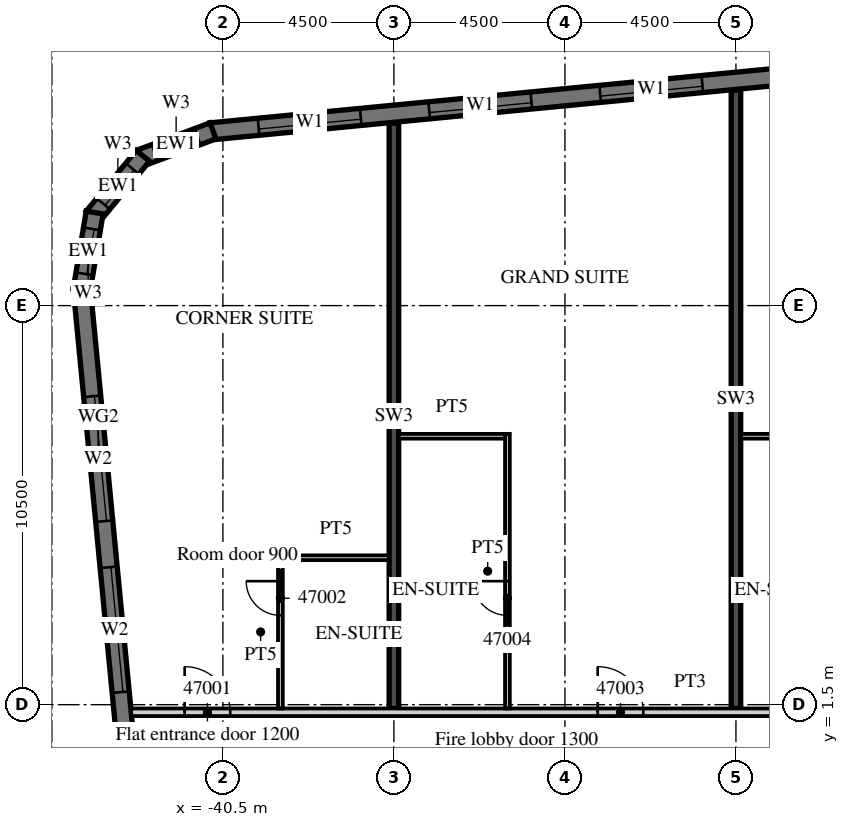
"""IFC4 building model, lengths in metres.
Left out: names, types, materials, properties, quantities, classifications, styles, units other than length and angle.
Written with IfcOpenShell. Run it as: python <this file> out.ifc"""

import sys

from ifc_helpers import new_model, si_unit, direction, frame, frame_2d, origin, place, context, subcontext, project, spatial, polyline, rectangle, outline, extrude, element, fill, save


model = new_model("IFC4")
c1 = context("Model", 3, precision=1e-05, world=origin(), true_north=direction((0.0, 1.0)))
c2 = subcontext(c1, "Body", "Model", "MODEL_VIEW")
j1 = project(units=[si_unit("LENGTHUNIT", "METRE"), si_unit("PLANEANGLEUNIT", "RADIAN")], contexts=[c1])
p1 = place(None, origin())
s1 = spatial("IfcSite", under=j1, at=p1, CompositionType="ELEMENT")
p2 = place(p1, origin())
s2 = spatial("IfcBuilding", under=s1, at=p2, CompositionType="ELEMENT")
p3 = place(p2, frame((0.0, 0.0, 196.6)))
s3 = spatial("IfcBuildingStorey", under=s2, at=p3, CompositionType="ELEMENT", Elevation=196.6)
p4 = place(p3, frame((-36.0, 1.4, 0.0), z_axis=(0.0, 0.0, 1.0), x_axis=(0.0, 1.0, 0.0)))
e1 = element("IfcWall", 1, at=p4, inside=s3, PredefinedType="SHEAR", context=c2, shape_type="SweptSolid", body=[
    extrude(rectangle(XDim=15.401, YDim=0.25, at=frame_2d((7.701, 0.0))), origin(), (0.0, 0.0, 1.0), 3.3),
])
p5 = place(p3, frame((-27.0, 1.4, 0.0), z_axis=(0.0, 0.0, 1.0), x_axis=(0.0, 1.0, 0.0)))
e2 = element("IfcWall", 2, at=p5, inside=s3, PredefinedType="SHEAR", context=c2, shape_type="SweptSolid", body=[
    extrude(rectangle(XDim=16.268, YDim=0.25, at=frame_2d((8.134, 0.0))), origin(), (0.0, 0.0, 1.0), 3.3),
])
p6 = place(p3, frame((-44.214, 12.466, 0.0), z_axis=(0.0, 0.0, 1.0), x_axis=(0.095847314626, -0.995396047952, 0.0)))
e3 = element("IfcWall", 3, at=p6, inside=s3, PredefinedType="SOLIDWALL", context=c2, shape_type="SweptSolid", body=[
    extrude(rectangle(XDim=34.0, YDim=0.45, at=frame_2d((17.0, 0.0))), origin(), (0.0, 0.0, 1.0), 3.02),
])
p7 = place(p6, frame((2.865, 0.0, 0.45)))
e4 = element("IfcOpeningElement", 4, at=p7, cuts=e3, PredefinedType="OPENING", context=c2, shape_type="SweptSolid", body=[
    extrude(rectangle(XDim=3.3, YDim=2.25, at=frame_2d((1.65, 1.125))), frame((0.0, 0.235, 0.0), z_axis=(0.0, -1.0, 0.0), x_axis=(1.0, 0.0, 0.0)), (0.0, 0.0, 1.0), 0.47),
])
p8 = place(p6, frame((7.386, 0.0, 0.45)))
e5 = element("IfcOpeningElement", 5, at=p8, cuts=e3, PredefinedType="OPENING", context=c2, shape_type="SweptSolid", body=[
    extrude(rectangle(XDim=3.3, YDim=2.25, at=frame_2d((1.65, 1.125))), frame((0.0, 0.235, 0.0), z_axis=(0.0, -1.0, 0.0), x_axis=(1.0, 0.0, 0.0)), (0.0, 0.0, 1.0), 0.47),
])
p9 = place(p3, frame((13.521, 21.817, 0.0), z_axis=(0.0, 0.0, 1.0), x_axis=(-0.995396508751, -0.095842529008, 0.0)))
e6 = element("IfcWall", 6, at=p9, inside=s3, PredefinedType="SOLIDWALL", context=c2, shape_type="SweptSolid", body=[
    extrude(rectangle(XDim=54.591, YDim=0.45, at=frame_2d((27.296, 0.0))), origin(), (0.0, 0.0, 1.0), 3.02),
])
p10 = place(p9, frame((0.91, 0.0, 0.45)))
e7 = element("IfcOpeningElement", 7, at=p10, cuts=e6, PredefinedType="OPENING", context=c2, shape_type="SweptSolid", body=[
    extrude(rectangle(XDim=2.7, YDim=2.25, at=frame_2d((1.35, 1.125))), frame((0.0, 0.235, 0.0), z_axis=(0.0, -1.0, 0.0), x_axis=(1.0, 0.0, 0.0)), (0.0, 0.0, 1.0), 0.47),
])
p11 = place(p9, frame((5.431, 0.0, 0.45)))
e8 = element("IfcOpeningElement", 8, at=p11, cuts=e6, PredefinedType="OPENING", context=c2, shape_type="SweptSolid", body=[
    extrude(rectangle(XDim=2.7, YDim=2.25, at=frame_2d((1.35, 1.125))), frame((0.0, 0.235, 0.0), z_axis=(0.0, -1.0, 0.0), x_axis=(1.0, 0.0, 0.0)), (0.0, 0.0, 1.0), 0.47),
])
p12 = place(p9, frame((9.952, 0.0, 0.45)))
e9 = element("IfcOpeningElement", 9, at=p12, cuts=e6, PredefinedType="OPENING", context=c2, shape_type="SweptSolid", body=[
    extrude(rectangle(XDim=2.7, YDim=2.25, at=frame_2d((1.35, 1.125))), frame((0.0, 0.235, 0.0), z_axis=(0.0, -1.0, 0.0), x_axis=(1.0, 0.0, 0.0)), (0.0, 0.0, 1.0), 0.47),
])
p13 = place(p9, frame((14.473, 0.0, 0.45)))
e10 = element("IfcOpeningElement", 10, at=p13, cuts=e6, PredefinedType="OPENING", context=c2, shape_type="SweptSolid", body=[
    extrude(rectangle(XDim=2.7, YDim=2.25, at=frame_2d((1.35, 1.125))), frame((0.0, 0.235, 0.0), z_axis=(0.0, -1.0, 0.0), x_axis=(1.0, 0.0, 0.0)), (0.0, 0.0, 1.0), 0.47),
])
p14 = place(p9, frame((18.994, 0.0, 0.45)))
e11 = element("IfcOpeningElement", 11, at=p14, cuts=e6, PredefinedType="OPENING", context=c2, shape_type="SweptSolid", body=[
    extrude(rectangle(XDim=2.7, YDim=2.25, at=frame_2d((1.35, 1.125))), frame((0.0, 0.235, 0.0), z_axis=(0.0, -1.0, 0.0), x_axis=(1.0, 0.0, 0.0)), (0.0, 0.0, 1.0), 0.47),
])
p15 = place(p9, frame((23.514, 0.0, 0.45)))
e12 = element("IfcOpeningElement", 12, at=p15, cuts=e6, PredefinedType="OPENING", context=c2, shape_type="SweptSolid", body=[
    extrude(rectangle(XDim=2.7, YDim=2.25, at=frame_2d((1.35, 1.125))), frame((0.0, 0.235, 0.0), z_axis=(0.0, -1.0, 0.0), x_axis=(1.0, 0.0, 0.0)), (0.0, 0.0, 1.0), 0.47),
])
p16 = place(p9, frame((28.035, 0.0, 0.45)))
e13 = element("IfcOpeningElement", 13, at=p16, cuts=e6, PredefinedType="OPENING", context=c2, shape_type="SweptSolid", body=[
    extrude(rectangle(XDim=2.7, YDim=2.25, at=frame_2d((1.35, 1.125))), frame((0.0, 0.235, 0.0), z_axis=(0.0, -1.0, 0.0), x_axis=(1.0, 0.0, 0.0)), (0.0, 0.0, 1.0), 0.47),
])
p17 = place(p9, frame((32.556, 0.0, 0.45)))
e14 = element("IfcOpeningElement", 14, at=p17, cuts=e6, PredefinedType="OPENING", context=c2, shape_type="SweptSolid", body=[
    extrude(rectangle(XDim=2.7, YDim=2.25, at=frame_2d((1.35, 1.125))), frame((0.0, 0.235, 0.0), z_axis=(0.0, -1.0, 0.0), x_axis=(1.0, 0.0, 0.0)), (0.0, 0.0, 1.0), 0.47),
])
p18 = place(p9, frame((37.077, 0.0, 0.45)))
e15 = element("IfcOpeningElement", 15, at=p18, cuts=e6, PredefinedType="OPENING", context=c2, shape_type="SweptSolid", body=[
    extrude(rectangle(XDim=2.7, YDim=2.25, at=frame_2d((1.35, 1.125))), frame((0.0, 0.235, 0.0), z_axis=(0.0, -1.0, 0.0), x_axis=(1.0, 0.0, 0.0)), (0.0, 0.0, 1.0), 0.47),
])
p19 = place(p9, frame((41.598, 0.0, 0.45)))
e16 = element("IfcOpeningElement", 16, at=p19, cuts=e6, PredefinedType="OPENING", context=c2, shape_type="SweptSolid", body=[
    extrude(rectangle(XDim=2.7, YDim=2.25, at=frame_2d((1.35, 1.125))), frame((0.0, 0.235, 0.0), z_axis=(0.0, -1.0, 0.0), x_axis=(1.0, 0.0, 0.0)), (0.0, 0.0, 1.0), 0.47),
])
p20 = place(p9, frame((46.118, 0.0, 0.45)))
e17 = element("IfcOpeningElement", 17, at=p20, cuts=e6, PredefinedType="OPENING", context=c2, shape_type="SweptSolid", body=[
    extrude(rectangle(XDim=2.7, YDim=2.25, at=frame_2d((1.35, 1.125))), frame((0.0, 0.235, 0.0), z_axis=(0.0, -1.0, 0.0), x_axis=(1.0, 0.0, 0.0)), (0.0, 0.0, 1.0), 0.47),
])
p21 = place(p9, frame((50.629, 0.0, 0.45)))
e18 = element("IfcOpeningElement", 18, at=p21, cuts=e6, PredefinedType="OPENING", context=c2, shape_type="SweptSolid", body=[
    extrude(rectangle(XDim=2.7, YDim=2.25, at=frame_2d((1.35, 1.125))), frame((0.0, 0.235, 0.0), z_axis=(0.0, -1.0, 0.0), x_axis=(1.0, 0.0, 0.0)), (0.0, 0.0, 1.0), 0.47),
])
p22 = place(p3, frame((-40.761, 16.598, 0.0), z_axis=(0.0, 0.0, 1.0), x_axis=(-0.936677599948, -0.350192909346, 0.0)))
e19 = element("IfcWall", 19, at=p22, inside=s3, PredefinedType="SOLIDWALL", context=c2, shape_type="SweptSolid", body=[
    extrude(outline(polyline([(0.0, -0.225), (2.071, -0.225), (1.95, 0.225), (0.121, 0.225), (0.0, -0.225)])), origin(), (0.0, 0.0, 1.0), 3.02),
])
p23 = place(p22, frame((0.435, 0.0, 0.45)))
e20 = element("IfcOpeningElement", 20, at=p23, cuts=e19, PredefinedType="OPENING", context=c2, shape_type="SweptSolid", body=[
    extrude(rectangle(XDim=1.2, YDim=2.25, at=frame_2d((0.6, 1.125))), frame((0.0, 0.235, 0.0), z_axis=(0.0, -1.0, 0.0), x_axis=(1.0, 0.0, 0.0)), (0.0, 0.0, 1.0), 0.47),
])
p24 = place(p3, frame((-42.606, 15.941, 0.0), z_axis=(0.0, 0.0, 1.0), x_axis=(-0.636116318187, -0.771593176315, 0.0)))
e21 = element("IfcWall", 21, at=p24, inside=s3, PredefinedType="SOLIDWALL", context=c2, shape_type="SweptSolid", body=[
    extrude(outline(polyline([(0.0, -0.225), (2.071, -0.225), (1.95, 0.225), (0.121, 0.225), (0.0, -0.225)])), origin(), (0.0, 0.0, 1.0), 3.02),
])
p25 = place(p24, frame((0.435, 0.0, 0.45)))
e22 = element("IfcOpeningElement", 22, at=p25, cuts=e21, PredefinedType="OPENING", context=c2, shape_type="SweptSolid", body=[
    extrude(rectangle(XDim=1.2, YDim=2.25, at=frame_2d((0.6, 1.125))), frame((0.0, 0.235, 0.0), z_axis=(0.0, -1.0, 0.0), x_axis=(1.0, 0.0, 0.0)), (0.0, 0.0, 1.0), 0.47),
])
p26 = place(p3, frame((-43.875, 14.449, 0.0), z_axis=(0.0, 0.0, 1.0), x_axis=(-0.164953448126, -0.986301353518, 0.0)))
e23 = element("IfcWall", 23, at=p26, inside=s3, PredefinedType="SOLIDWALL", context=c2, shape_type="SweptSolid", body=[
    extrude(outline(polyline([(0.0, -0.225), (2.071, -0.225), (1.95, 0.225), (0.121, 0.225), (0.0, -0.225)])), origin(), (0.0, 0.0, 1.0), 3.02),
])
p27 = place(p26, frame((0.435, 0.0, 0.45)))
e24 = element("IfcOpeningElement", 24, at=p27, cuts=e23, PredefinedType="OPENING", context=c2, shape_type="SweptSolid", body=[
    extrude(rectangle(XDim=1.2, YDim=2.25, at=frame_2d((0.6, 1.125))), frame((0.0, 0.235, 0.0), z_axis=(0.0, -1.0, 0.0), x_axis=(1.0, 0.0, 0.0)), (0.0, 0.0, 1.0), 0.47),
])
p28 = place(p3, frame((-42.913, 1.3, 0.0), z_axis=(0.0, 0.0, 1.0), x_axis=(1.0, 0.0, 0.0)))
e25 = element("IfcWall", 25, at=p28, inside=s3, PredefinedType="PARTITIONING", context=c2, shape_type="SweptSolid", body=[
    extrude(rectangle(XDim=29.413, YDim=0.2, at=frame_2d((14.707, 0.0))), origin(), (0.0, 0.0, 1.0), 3.02),
])
p29 = place(p28, frame((1.406, 0.0, 0.0)))
e26 = element("IfcOpeningElement", 26, at=p29, cuts=e25, PredefinedType="OPENING", context=c2, shape_type="SweptSolid", body=[
    extrude(rectangle(XDim=1.2, YDim=2.1, at=frame_2d((0.6, 1.05))), frame((0.0, 0.11, 0.0), z_axis=(0.0, -1.0, 0.0), x_axis=(1.0, 0.0, 0.0)), (0.0, 0.0, 1.0), 0.22),
])
p30 = place(p28, frame((12.275, 0.0, 0.0)))
e27 = element("IfcOpeningElement", 27, at=p30, cuts=e25, PredefinedType="OPENING", context=c2, shape_type="SweptSolid", body=[
    extrude(rectangle(XDim=1.2, YDim=2.1, at=frame_2d((0.6, 1.05))), frame((0.0, 0.11, 0.0), z_axis=(0.0, -1.0, 0.0), x_axis=(1.0, 0.0, 0.0)), (0.0, 0.0, 1.0), 0.22),
])
p31 = place(p28, frame((21.275, 0.0, 0.0)))
e28 = element("IfcOpeningElement", 28, at=p31, cuts=e25, PredefinedType="OPENING", context=c2, shape_type="SweptSolid", body=[
    extrude(rectangle(XDim=1.2, YDim=2.1, at=frame_2d((0.6, 1.05))), frame((0.0, 0.11, 0.0), z_axis=(0.0, -1.0, 0.0), x_axis=(1.0, 0.0, 0.0)), (0.0, 0.0, 1.0), 0.22),
])
p32 = place(p28, frame((27.838, 0.0, 0.0)))
e29 = element("IfcOpeningElement", 29, at=p32, cuts=e25, PredefinedType="OPENING", context=c2, shape_type="SweptSolid", body=[
    extrude(rectangle(XDim=1.0, YDim=2.1, at=frame_2d((0.5, 1.05))), frame((0.0, 0.11, 0.0), z_axis=(0.0, -1.0, 0.0), x_axis=(1.0, 0.0, 0.0)), (0.0, 0.0, 1.0), 0.22),
])
p33 = place(p3, frame((-38.987, 1.4, 0.0), z_axis=(0.0, 0.0, 1.0), x_axis=(0.0, 1.0, 0.0)))
e30 = element("IfcWall", 30, at=p33, inside=s3, PredefinedType="PARTITIONING", context=c2, shape_type="SweptSolid", body=[
    extrude(rectangle(XDim=4.028, YDim=0.125, at=frame_2d((2.014, 0.0))), origin(), (0.0, 0.0, 1.0), 3.02),
])
p34 = place(p33, frame((2.45, 0.0, 0.0)))
e31 = element("IfcOpeningElement", 31, at=p34, cuts=e30, PredefinedType="OPENING", context=c2, shape_type="SweptSolid", body=[
    extrude(rectangle(XDim=0.9, YDim=2.1, at=frame_2d((0.45, 1.05))), frame((0.0, 0.073, 0.0), z_axis=(0.0, -1.0, 0.0), x_axis=(1.0, 0.0, 0.0)), (0.0, 0.0, 1.0), 0.145),
])
p35 = place(p3, frame((-38.925, 5.366, 0.0), z_axis=(0.0, 0.0, 1.0), x_axis=(1.0, 0.0, 0.0)))
e32 = element("IfcWall", 32, at=p35, inside=s3, PredefinedType="PARTITIONING", context=c2, shape_type="SweptSolid", body=[
    extrude(rectangle(XDim=2.8, YDim=0.125, at=frame_2d((1.4, 0.0))), origin(), (0.0, 0.0, 1.0), 3.02),
])
p36 = place(p3, frame((-33.013, 1.4, 0.0), z_axis=(0.0, 0.0, 1.0), x_axis=(0.0, 1.0, 0.0)))
e33 = element("IfcWall", 33, at=p36, inside=s3, PredefinedType="PARTITIONING", context=c2, shape_type="SweptSolid", body=[
    extrude(rectangle(XDim=7.225, YDim=0.125, at=frame_2d((3.613, 0.0))), origin(), (0.0, 0.0, 1.0), 3.02),
])
p37 = place(p36, frame((2.45, 0.0, 0.0)))
e34 = element("IfcOpeningElement", 34, at=p37, cuts=e33, PredefinedType="OPENING", context=c2, shape_type="SweptSolid", body=[
    extrude(rectangle(XDim=0.9, YDim=2.1, at=frame_2d((0.45, 1.05))), frame((0.0, 0.073, 0.0), z_axis=(0.0, -1.0, 0.0), x_axis=(1.0, 0.0, 0.0)), (0.0, 0.0, 1.0), 0.145),
])
for number, where, z_axis, x_axis in (
    (35, (-35.875, 8.562, 0.0), (0.0, 0.0, 1.0), (1.0, 0.0, 0.0)),
    (36, (-26.875, 8.562, 0.0), (0.0, 0.0, 1.0), (1.0, 0.0, 0.0)),
):
    element("IfcWall", number, at=place(p3, frame(where, z_axis=z_axis, x_axis=x_axis)), inside=s3, PredefinedType="PARTITIONING", context=c2, shape_type="SweptSolid", body=[
        extrude(rectangle(XDim=2.8, YDim=0.125, at=frame_2d((1.4, 0.0))), origin(), (0.0, 0.0, 1.0), 3.02),
    ])
p38 = place(p7, origin())
e37 = element("IfcWindow", 37, at=p38, inside=s3, PartitioningType="SINGLE_PANEL", PredefinedType="WINDOW", context=c2, shape_type="SweptSolid", body=[
    extrude(rectangle(XDim=3.3, YDim=2.25, at=frame_2d((1.65, 1.125))), frame((0.0, 0.09, 0.0), z_axis=(0.0, -1.0, 0.0), x_axis=(1.0, 0.0, 0.0)), (0.0, 0.0, 1.0), 0.06),
])
fill(e4, e37)
p39 = place(p8, origin())
e38 = element("IfcWindow", 38, at=p39, inside=s3, PartitioningType="SINGLE_PANEL", PredefinedType="WINDOW", context=c2, shape_type="SweptSolid", body=[
    extrude(rectangle(XDim=3.3, YDim=2.25, at=frame_2d((1.65, 1.125))), frame((0.0, 0.09, 0.0), z_axis=(0.0, -1.0, 0.0), x_axis=(1.0, 0.0, 0.0)), (0.0, 0.0, 1.0), 0.06),
])
fill(e5, e38)
p40 = place(p19, origin())
e39 = element("IfcWindow", 39, at=p40, inside=s3, PartitioningType="SINGLE_PANEL", PredefinedType="WINDOW", context=c2, shape_type="SweptSolid", body=[
    extrude(rectangle(XDim=2.7, YDim=2.25, at=frame_2d((1.35, 1.125))), frame((0.0, 0.09, 0.0), z_axis=(0.0, -1.0, 0.0), x_axis=(1.0, 0.0, 0.0)), (0.0, 0.0, 1.0), 0.06),
])
fill(e16, e39)
p41 = place(p20, origin())
e40 = element("IfcWindow", 40, at=p41, inside=s3, PartitioningType="SINGLE_PANEL", PredefinedType="WINDOW", context=c2, shape_type="SweptSolid", body=[
    extrude(rectangle(XDim=2.7, YDim=2.25, at=frame_2d((1.35, 1.125))), frame((0.0, 0.09, 0.0), z_axis=(0.0, -1.0, 0.0), x_axis=(1.0, 0.0, 0.0)), (0.0, 0.0, 1.0), 0.06),
])
fill(e17, e40)
p42 = place(p21, origin())
e41 = element("IfcWindow", 41, at=p42, inside=s3, PartitioningType="SINGLE_PANEL", PredefinedType="WINDOW", context=c2, shape_type="SweptSolid", body=[
    extrude(rectangle(XDim=2.7, YDim=2.25, at=frame_2d((1.35, 1.125))), frame((0.0, 0.09, 0.0), z_axis=(0.0, -1.0, 0.0), x_axis=(1.0, 0.0, 0.0)), (0.0, 0.0, 1.0), 0.06),
])
fill(e18, e41)
p43 = place(p23, origin())
e42 = element("IfcWindow", 42, at=p43, inside=s3, PartitioningType="SINGLE_PANEL", PredefinedType="WINDOW", context=c2, shape_type="SweptSolid", body=[
    extrude(rectangle(XDim=1.2, YDim=2.25, at=frame_2d((0.6, 1.125))), frame((0.0, 0.09, 0.0), z_axis=(0.0, -1.0, 0.0), x_axis=(1.0, 0.0, 0.0)), (0.0, 0.0, 1.0), 0.06),
])
fill(e20, e42)
p44 = place(p25, origin())
e43 = element("IfcWindow", 43, at=p44, inside=s3, PartitioningType="SINGLE_PANEL", PredefinedType="WINDOW", context=c2, shape_type="SweptSolid", body=[
    extrude(rectangle(XDim=1.2, YDim=2.25, at=frame_2d((0.6, 1.125))), frame((0.0, 0.09, 0.0), z_axis=(0.0, -1.0, 0.0), x_axis=(1.0, 0.0, 0.0)), (0.0, 0.0, 1.0), 0.06),
])
fill(e22, e43)
p45 = place(p27, origin())
e44 = element("IfcWindow", 44, at=p45, inside=s3, PartitioningType="SINGLE_PANEL", PredefinedType="WINDOW", context=c2, shape_type="SweptSolid", body=[
    extrude(rectangle(XDim=1.2, YDim=2.25, at=frame_2d((0.6, 1.125))), frame((0.0, 0.09, 0.0), z_axis=(0.0, -1.0, 0.0), x_axis=(1.0, 0.0, 0.0)), (0.0, 0.0, 1.0), 0.06),
])
fill(e24, e44)
p46 = place(p29, origin())
e45 = element("IfcDoor", 45, at=p46, inside=s3, OperationType="SINGLE_SWING_LEFT", PredefinedType="DOOR", context=c2, shape_type="SweptSolid", body=[
    extrude(rectangle(XDim=1.2, YDim=2.1, at=frame_2d((0.6, 1.05))), frame((0.0, 0.025, 0.0), z_axis=(0.0, -1.0, 0.0), x_axis=(1.0, 0.0, 0.0)), (0.0, 0.0, 1.0), 0.05),
])
fill(e26, e45)
p47 = place(p34, origin())
e46 = element("IfcDoor", 46, at=p47, inside=s3, OperationType="SINGLE_SWING_RIGHT", PredefinedType="DOOR", context=c2, shape_type="SweptSolid", body=[
    extrude(rectangle(XDim=0.9, YDim=2.1, at=frame_2d((0.45, 1.05))), frame((0.0, 0.025, 0.0), z_axis=(0.0, -1.0, 0.0), x_axis=(1.0, 0.0, 0.0)), (0.0, 0.0, 1.0), 0.05),
])
fill(e31, e46)
p48 = place(p30, origin())
e47 = element("IfcDoor", 47, at=p48, inside=s3, OperationType="SINGLE_SWING_LEFT", PredefinedType="DOOR", context=c2, shape_type="SweptSolid", body=[
    extrude(rectangle(XDim=1.2, YDim=2.1, at=frame_2d((0.6, 1.05))), frame((0.0, 0.025, 0.0), z_axis=(0.0, -1.0, 0.0), x_axis=(1.0, 0.0, 0.0)), (0.0, 0.0, 1.0), 0.05),
])
fill(e27, e47)
p49 = place(p37, origin())
e48 = element("IfcDoor", 48, at=p49, inside=s3, OperationType="SINGLE_SWING_RIGHT", PredefinedType="DOOR", context=c2, shape_type="SweptSolid", body=[
    extrude(rectangle(XDim=0.9, YDim=2.1, at=frame_2d((0.45, 1.05))), frame((0.0, 0.025, 0.0), z_axis=(0.0, -1.0, 0.0), x_axis=(1.0, 0.0, 0.0)), (0.0, 0.0, 1.0), 0.05),
])
fill(e34, e48)
save(model, sys.argv[1])
